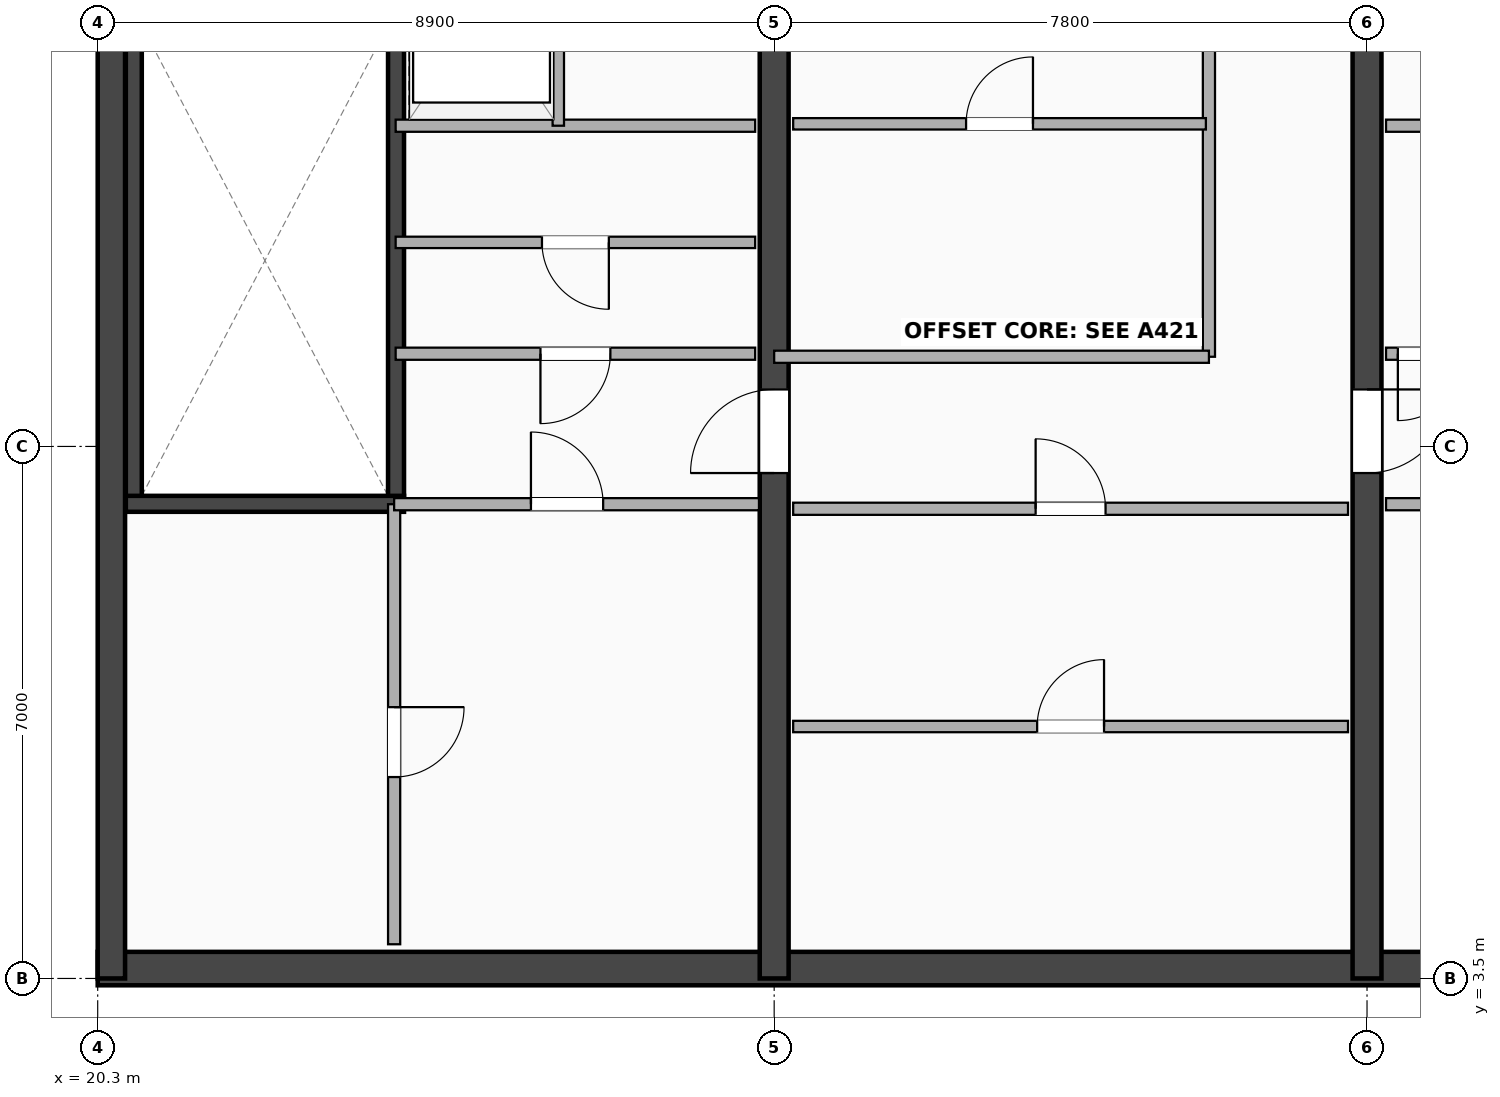
"""IFC4 building model, lengths in metres.
Left out: names, types, materials, properties, quantities, classifications, styles, units other than length and angle.
Written with IfcOpenShell. Run it as: python <this file> out.ifc"""

import sys

from ifc_helpers import new_model, si_unit, direction, frame, frame_2d, origin, place, context, subcontext, project, spatial, rectangle, extrude, element, fill, save


model = new_model("IFC4")
c1 = context("Model", 3, precision=1e-05, world=origin(), true_north=direction((0.0, 1.0)))
c2 = subcontext(c1, "Body", "Model", "MODEL_VIEW")
j1 = project(units=[si_unit("LENGTHUNIT", "METRE"), si_unit("PLANEANGLEUNIT", "RADIAN")], contexts=[c1])
p1 = place(None, origin())
s1 = spatial("IfcSite", under=j1, at=p1, CompositionType="ELEMENT")
p2 = place(p1, origin())
s2 = spatial("IfcBuilding", under=s1, at=p2, CompositionType="ELEMENT")
p3 = place(p2, frame((0.0, 0.0, 317.1)))
s3 = spatial("IfcBuildingStorey", under=s2, at=p3, CompositionType="ELEMENT", Elevation=317.1)
p4 = place(p3, frame((20.3, 3.63, 0.0), z_axis=(0.0, 0.0, 1.0), x_axis=(1.0, 0.0, 0.0)))
e1 = element("IfcWall", 1, at=p4, inside=s3, PredefinedType="SHEAR", context=c2, shape_type="SweptSolid", body=[
    extrude(rectangle(XDim=24.5, YDim=0.44, at=frame_2d((12.25, 0.0))), origin(), (0.0, 0.0, 1.0), 4.3),
])
p5 = place(p3, frame((20.48, 3.5, 0.0), z_axis=(0.0, 0.0, 1.0), x_axis=(0.0, 1.0, 0.0)))
e2 = element("IfcWall", 2, at=p5, inside=s3, PredefinedType="SHEAR", context=c2, shape_type="SweptSolid", body=[
    extrude(rectangle(XDim=16.9, YDim=0.36, at=frame_2d((8.45, 0.0))), origin(), (0.0, 0.0, 1.0), 4.3),
])
p6 = place(p3, frame((29.2, 3.5, 0.0), z_axis=(0.0, 0.0, 1.0), x_axis=(0.0, 1.0, 0.0)))
e3 = element("IfcWall", 3, at=p6, inside=s3, PredefinedType="SHEAR", context=c2, shape_type="SweptSolid", body=[
    extrude(rectangle(XDim=14.95, YDim=0.38, at=frame_2d((7.475, 0.0))), origin(), (0.0, 0.0, 1.0), 4.3),
])
p7 = place(p6, frame((7.75, 0.0, 0.0), z_axis=(0.0, 0.0, 1.0), x_axis=(-1.0, 0.0, 0.0)))
e4 = element("IfcOpeningElement", 4, at=p7, cuts=e3, PredefinedType="OPENING", context=c2, shape_type="SweptSolid", body=[
    extrude(rectangle(XDim=1.1, YDim=2.15, at=frame_2d((0.55, 1.075))), frame((0.0, 0.2, 0.0), z_axis=(0.0, -1.0, 0.0), x_axis=(1.0, 0.0, 0.0)), (0.0, 0.0, 1.0), 0.4),
])
p8 = place(p3, frame((37.0, 3.5, 0.0), z_axis=(0.0, 0.0, 1.0), x_axis=(0.0, 1.0, 0.0)))
e5 = element("IfcWall", 5, at=p8, inside=s3, PredefinedType="SHEAR", context=c2, shape_type="SweptSolid", body=[
    extrude(rectangle(XDim=14.95, YDim=0.38, at=frame_2d((7.475, 0.0))), origin(), (0.0, 0.0, 1.0), 4.3),
])
p9 = place(p8, frame((6.65, 0.0, 0.0)))
e6 = element("IfcOpeningElement", 6, at=p9, cuts=e5, PredefinedType="OPENING", context=c2, shape_type="SweptSolid", body=[
    extrude(rectangle(XDim=1.1, YDim=2.15, at=frame_2d((0.55, 1.075))), frame((0.0, 0.2, 0.0), z_axis=(0.0, -1.0, 0.0), x_axis=(1.0, 0.0, 0.0)), (0.0, 0.0, 1.0), 0.4),
])
for number, where, z_axis, x_axis in (
    (7, (20.775, 9.745, 0.0), (0.0, 0.0, 1.0), (0.0, 1.0, 0.0)),
    (8, (24.225, 9.745, 0.0), (0.0, 0.0, 1.0), (0.0, 1.0, 0.0)),
):
    element("IfcWall", number, at=place(p3, frame(where, z_axis=z_axis, x_axis=x_axis)), inside=s3, PredefinedType="SHEAR", context=c2, shape_type="SweptSolid", body=[
        extrude(rectangle(XDim=8.01, YDim=0.21, at=frame_2d((4.005, 0.0))), origin(), (0.0, 0.0, 1.0), 4.3),
    ])
p10 = place(p3, frame((20.67, 9.745, 0.0), z_axis=(0.0, 0.0, 1.0), x_axis=(1.0, 0.0, 0.0)))
e9 = element("IfcWall", 9, at=p10, inside=s3, PredefinedType="SHEAR", context=c2, shape_type="SweptSolid", body=[
    extrude(rectangle(XDim=3.66, YDim=0.21, at=frame_2d((1.83, 0.0))), origin(), (0.0, 0.0, 1.0), 4.3),
])
p11 = place(p3, frame((24.22, 14.72, 0.0), z_axis=(0.0, 0.0, 1.0), x_axis=(1.0, 0.0, 0.0)))
e10 = element("IfcWall", 10, at=p11, inside=s3, PredefinedType="PARTITIONING", context=c2, shape_type="SweptSolid", body=[
    extrude(rectangle(XDim=4.73, YDim=0.16, at=frame_2d((2.365, 0.0))), origin(), (0.0, 0.0, 1.0), 4.3),
])
p12 = place(p3, frame((26.36, 14.72, 0.0), z_axis=(0.0, 0.0, 1.0), x_axis=(0.0, 1.0, 0.0)))
e11 = element("IfcWall", 11, at=p12, inside=s3, PredefinedType="PARTITIONING", context=c2, shape_type="SweptSolid", body=[
    extrude(rectangle(XDim=3.04, YDim=0.15, at=frame_2d((1.52, 0.0))), origin(), (0.0, 0.0, 1.0), 4.3),
])
p13 = place(p3, frame((37.25, 14.72, 0.0), z_axis=(0.0, 0.0, 1.0), x_axis=(1.0, 0.0, 0.0)))
e12 = element("IfcWall", 12, at=p13, inside=s3, PredefinedType="PARTITIONING", context=c2, shape_type="SweptSolid", body=[
    extrude(rectangle(XDim=3.61, YDim=0.16, at=frame_2d((1.805, 0.0))), origin(), (0.0, 0.0, 1.0), 4.3),
])
p14 = place(p3, frame((24.22, 11.72, 0.0), z_axis=(0.0, 0.0, 1.0), x_axis=(1.0, 0.0, 0.0)))
e13 = element("IfcWall", 13, at=p14, inside=s3, PredefinedType="PARTITIONING", context=c2, shape_type="SweptSolid", body=[
    extrude(rectangle(XDim=4.73, YDim=0.16, at=frame_2d((2.365, 0.0))), origin(), (0.0, 0.0, 1.0), 4.3),
])
p15 = place(p14, frame((1.905, 0.0, 0.0)))
e14 = element("IfcOpeningElement", 14, at=p15, cuts=e13, PredefinedType="OPENING", context=c2, shape_type="SweptSolid", body=[
    extrude(rectangle(XDim=0.92, YDim=2.08, at=frame_2d((0.46, 1.04))), frame((0.0, 0.09, 0.0), z_axis=(0.0, -1.0, 0.0), x_axis=(1.0, 0.0, 0.0)), (0.0, 0.0, 1.0), 0.18),
])
p16 = place(p3, frame((24.22, 13.185, 0.0), z_axis=(0.0, 0.0, 1.0), x_axis=(1.0, 0.0, 0.0)))
e15 = element("IfcWall", 15, at=p16, inside=s3, PredefinedType="PARTITIONING", context=c2, shape_type="SweptSolid", body=[
    extrude(rectangle(XDim=4.73, YDim=0.15, at=frame_2d((2.365, 0.0))), origin(), (0.0, 0.0, 1.0), 4.3),
])
p17 = place(p16, frame((1.925, 0.0, 0.0)))
e16 = element("IfcOpeningElement", 16, at=p17, cuts=e15, PredefinedType="OPENING", context=c2, shape_type="SweptSolid", body=[
    extrude(rectangle(XDim=0.88, YDim=2.08, at=frame_2d((0.44, 1.04))), frame((0.0, 0.085, 0.0), z_axis=(0.0, -1.0, 0.0), x_axis=(1.0, 0.0, 0.0)), (0.0, 0.0, 1.0), 0.17),
])
p18 = place(p3, frame((37.25, 11.72, 0.0), z_axis=(0.0, 0.0, 1.0), x_axis=(1.0, 0.0, 0.0)))
e17 = element("IfcWall", 17, at=p18, inside=s3, PredefinedType="PARTITIONING", context=c2, shape_type="SweptSolid", body=[
    extrude(rectangle(XDim=1.191, YDim=0.16, at=frame_2d((0.596, 0.0))), origin(), (0.0, 0.0, 1.0), 4.3),
])
p19 = place(p18, frame((0.156, 0.0, 0.0)))
e18 = element("IfcOpeningElement", 18, at=p19, cuts=e17, PredefinedType="OPENING", context=c2, shape_type="SweptSolid", body=[
    extrude(rectangle(XDim=0.88, YDim=2.08, at=frame_2d((0.44, 1.04))), frame((0.0, 0.09, 0.0), z_axis=(0.0, -1.0, 0.0), x_axis=(1.0, 0.0, 0.0)), (0.0, 0.0, 1.0), 0.18),
])
p20 = place(p3, frame((24.2, 3.95, 0.0), z_axis=(0.0, 0.0, 1.0), x_axis=(0.0, 1.0, 0.0)))
e19 = element("IfcWall", 19, at=p20, inside=s3, PredefinedType="PARTITIONING", context=c2, shape_type="SweptSolid", body=[
    extrude(rectangle(XDim=5.79, YDim=0.16, at=frame_2d((2.895, 0.0))), origin(), (0.0, 0.0, 1.0), 4.3),
])
p21 = place(p20, frame((2.2, 0.0, 0.0)))
e20 = element("IfcOpeningElement", 20, at=p21, cuts=e19, PredefinedType="OPENING", context=c2, shape_type="SweptSolid", body=[
    extrude(rectangle(XDim=0.92, YDim=2.08, at=frame_2d((0.46, 1.04))), frame((0.0, 0.09, 0.0), z_axis=(0.0, -1.0, 0.0), x_axis=(1.0, 0.0, 0.0)), (0.0, 0.0, 1.0), 0.18),
])
p22 = place(p3, frame((24.2, 9.74, 0.0), z_axis=(0.0, 0.0, 1.0), x_axis=(1.0, 0.0, 0.0)))
e21 = element("IfcWall", 21, at=p22, inside=s3, PredefinedType="PARTITIONING", context=c2, shape_type="SweptSolid", body=[
    extrude(rectangle(XDim=4.8, YDim=0.16, at=frame_2d((2.4, 0.0))), origin(), (0.0, 0.0, 1.0), 4.3),
])
p23 = place(p22, frame((2.75, 0.0, 0.0), z_axis=(0.0, 0.0, 1.0), x_axis=(-1.0, 0.0, 0.0)))
e22 = element("IfcOpeningElement", 22, at=p23, cuts=e21, PredefinedType="OPENING", context=c2, shape_type="SweptSolid", body=[
    extrude(rectangle(XDim=0.95, YDim=2.15, at=frame_2d((0.475, 1.075))), frame((0.0, 0.09, 0.0), z_axis=(0.0, -1.0, 0.0), x_axis=(1.0, 0.0, 0.0)), (0.0, 0.0, 1.0), 0.18),
])
p24 = place(p3, frame((37.25, 9.74, 0.0), z_axis=(0.0, 0.0, 1.0), x_axis=(1.0, 0.0, 0.0)))
e23 = element("IfcWall", 23, at=p24, inside=s3, PredefinedType="PARTITIONING", context=c2, shape_type="SweptSolid", body=[
    extrude(rectangle(XDim=3.73, YDim=0.16, at=frame_2d((1.865, 0.0))), origin(), (0.0, 0.0, 1.0), 4.3),
])
p25 = place(p24, frame((2.25, 0.0, 0.0), z_axis=(0.0, 0.0, 1.0), x_axis=(-1.0, 0.0, 0.0)))
e24 = element("IfcOpeningElement", 24, at=p25, cuts=e23, PredefinedType="OPENING", context=c2, shape_type="SweptSolid", body=[
    extrude(rectangle(XDim=0.95, YDim=2.15, at=frame_2d((0.475, 1.075))), frame((0.0, 0.09, 0.0), z_axis=(0.0, -1.0, 0.0), x_axis=(1.0, 0.0, 0.0)), (0.0, 0.0, 1.0), 0.18),
])
p26 = place(p3, frame((34.92, 11.68, 0.0), z_axis=(0.0, 0.0, 1.0), x_axis=(0.0, 1.0, 0.0)))
e25 = element("IfcWall", 25, at=p26, inside=s3, PredefinedType="PARTITIONING", context=c2, shape_type="SweptSolid", body=[
    extrude(rectangle(XDim=6.1, YDim=0.16, at=frame_2d((3.05, 0.0))), origin(), (0.0, 0.0, 1.0), 4.3),
])
p27 = place(p3, frame((29.45, 9.68, 0.0), z_axis=(0.0, 0.0, 1.0), x_axis=(1.0, 0.0, 0.0)))
e26 = element("IfcWall", 26, at=p27, inside=s3, PredefinedType="PARTITIONING", context=c2, shape_type="SweptSolid", body=[
    extrude(rectangle(XDim=7.3, YDim=0.16, at=frame_2d((3.65, 0.0))), origin(), (0.0, 0.0, 1.0), 4.3),
])
p28 = place(p27, frame((4.11, 0.0, 0.0), z_axis=(0.0, 0.0, 1.0), x_axis=(-1.0, 0.0, 0.0)))
e27 = element("IfcOpeningElement", 27, at=p28, cuts=e26, PredefinedType="OPENING", context=c2, shape_type="SweptSolid", body=[
    extrude(rectangle(XDim=0.92, YDim=2.08, at=frame_2d((0.46, 1.04))), frame((0.0, 0.09, 0.0), z_axis=(0.0, -1.0, 0.0), x_axis=(1.0, 0.0, 0.0)), (0.0, 0.0, 1.0), 0.18),
])
p29 = place(p3, frame((29.45, 6.815, 0.0), z_axis=(0.0, 0.0, 1.0), x_axis=(1.0, 0.0, 0.0)))
e28 = element("IfcWall", 28, at=p29, inside=s3, PredefinedType="PARTITIONING", context=c2, shape_type="SweptSolid", body=[
    extrude(rectangle(XDim=7.3, YDim=0.15, at=frame_2d((3.65, 0.0))), origin(), (0.0, 0.0, 1.0), 4.3),
])
p30 = place(p29, frame((4.09, 0.0, 0.0), z_axis=(0.0, 0.0, 1.0), x_axis=(-1.0, 0.0, 0.0)))
e29 = element("IfcOpeningElement", 29, at=p30, cuts=e28, PredefinedType="OPENING", context=c2, shape_type="SweptSolid", body=[
    extrude(rectangle(XDim=0.88, YDim=2.08, at=frame_2d((0.44, 1.04))), frame((0.0, 0.085, 0.0), z_axis=(0.0, -1.0, 0.0), x_axis=(1.0, 0.0, 0.0)), (0.0, 0.0, 1.0), 0.17),
])
p31 = place(p3, frame((29.2, 11.68, 0.0), z_axis=(0.0, 0.0, 1.0), x_axis=(1.0, 0.0, 0.0)))
e30 = element("IfcWall", 30, at=p31, inside=s3, PredefinedType="PARTITIONING", context=c2, shape_type="SweptSolid", body=[
    extrude(rectangle(XDim=5.72, YDim=0.16, at=frame_2d((2.86, 0.0))), origin(), (0.0, 0.0, 1.0), 4.3),
])
p32 = place(p3, frame((29.45, 14.745, 0.0), z_axis=(0.0, 0.0, 1.0), x_axis=(1.0, 0.0, 0.0)))
e31 = element("IfcWall", 31, at=p32, inside=s3, PredefinedType="PARTITIONING", context=c2, shape_type="SweptSolid", body=[
    extrude(rectangle(XDim=5.43, YDim=0.15, at=frame_2d((2.715, 0.0))), origin(), (0.0, 0.0, 1.0), 4.3),
])
p33 = place(p32, frame((3.155, 0.0, 0.0), z_axis=(0.0, 0.0, 1.0), x_axis=(-1.0, 0.0, 0.0)))
e32 = element("IfcOpeningElement", 32, at=p33, cuts=e31, PredefinedType="OPENING", context=c2, shape_type="SweptSolid", body=[
    extrude(rectangle(XDim=0.88, YDim=2.08, at=frame_2d((0.44, 1.04))), frame((0.0, 0.085, 0.0), z_axis=(0.0, -1.0, 0.0), x_axis=(1.0, 0.0, 0.0)), (0.0, 0.0, 1.0), 0.17),
])
p34 = place(p7, origin())
e33 = element("IfcDoor", 33, at=p34, inside=s3, OperationType="SINGLE_SWING_LEFT", PredefinedType="DOOR", context=c2, shape_type="SweptSolid", body=[
    extrude(rectangle(XDim=1.1, YDim=2.15, at=frame_2d((0.55, 1.075))), frame((0.0, 0.025, 0.0), z_axis=(0.0, -1.0, 0.0), x_axis=(1.0, 0.0, 0.0)), (0.0, 0.0, 1.0), 0.05),
])
fill(e4, e33)
p35 = place(p9, origin())
e34 = element("IfcDoor", 34, at=p35, inside=s3, OperationType="SINGLE_SWING_RIGHT", PredefinedType="DOOR", context=c2, shape_type="SweptSolid", body=[
    extrude(rectangle(XDim=1.1, YDim=2.15, at=frame_2d((0.55, 1.075))), frame((0.0, 0.025, 0.0), z_axis=(0.0, -1.0, 0.0), x_axis=(1.0, 0.0, 0.0)), (0.0, 0.0, 1.0), 0.05),
])
fill(e6, e34)
p36 = place(p15, origin())
e35 = element("IfcDoor", 35, at=p36, inside=s3, OperationType="SINGLE_SWING_LEFT", PredefinedType="DOOR", context=c2, shape_type="SweptSolid", body=[
    extrude(rectangle(XDim=0.92, YDim=2.08, at=frame_2d((0.46, 1.04))), frame((0.0, 0.025, 0.0), z_axis=(0.0, -1.0, 0.0), x_axis=(1.0, 0.0, 0.0)), (0.0, 0.0, 1.0), 0.05),
])
fill(e14, e35)
p37 = place(p17, origin())
e36 = element("IfcDoor", 36, at=p37, inside=s3, OperationType="SINGLE_SWING_RIGHT", PredefinedType="DOOR", context=c2, shape_type="SweptSolid", body=[
    extrude(rectangle(XDim=0.88, YDim=2.08, at=frame_2d((0.44, 1.04))), frame((0.0, 0.025, 0.0), z_axis=(0.0, -1.0, 0.0), x_axis=(1.0, 0.0, 0.0)), (0.0, 0.0, 1.0), 0.05),
])
fill(e16, e36)
p38 = place(p19, origin())
e37 = element("IfcDoor", 37, at=p38, inside=s3, OperationType="SINGLE_SWING_LEFT", PredefinedType="DOOR", context=c2, shape_type="SweptSolid", body=[
    extrude(rectangle(XDim=0.88, YDim=2.08, at=frame_2d((0.44, 1.04))), frame((0.0, 0.025, 0.0), z_axis=(0.0, -1.0, 0.0), x_axis=(1.0, 0.0, 0.0)), (0.0, 0.0, 1.0), 0.05),
])
fill(e18, e37)
p39 = place(p21, origin())
e38 = element("IfcDoor", 38, at=p39, inside=s3, OperationType="SINGLE_SWING_RIGHT", PredefinedType="DOOR", context=c2, shape_type="SweptSolid", body=[
    extrude(rectangle(XDim=0.92, YDim=2.08, at=frame_2d((0.46, 1.04))), frame((0.0, 0.025, 0.0), z_axis=(0.0, -1.0, 0.0), x_axis=(1.0, 0.0, 0.0)), (0.0, 0.0, 1.0), 0.05),
])
fill(e20, e38)
p40 = place(p23, origin())
e39 = element("IfcDoor", 39, at=p40, inside=s3, OperationType="SINGLE_SWING_LEFT", PredefinedType="DOOR", context=c2, shape_type="SweptSolid", body=[
    extrude(rectangle(XDim=0.95, YDim=2.15, at=frame_2d((0.475, 1.075))), frame((0.0, 0.025, 0.0), z_axis=(0.0, -1.0, 0.0), x_axis=(1.0, 0.0, 0.0)), (0.0, 0.0, 1.0), 0.05),
])
fill(e22, e39)
p41 = place(p28, origin())
e40 = element("IfcDoor", 40, at=p41, inside=s3, OperationType="SINGLE_SWING_LEFT", PredefinedType="DOOR", context=c2, shape_type="SweptSolid", body=[
    extrude(rectangle(XDim=0.92, YDim=2.08, at=frame_2d((0.46, 1.04))), frame((0.0, 0.025, 0.0), z_axis=(0.0, -1.0, 0.0), x_axis=(1.0, 0.0, 0.0)), (0.0, 0.0, 1.0), 0.05),
])
fill(e27, e40)
p42 = place(p30, origin())
e41 = element("IfcDoor", 41, at=p42, inside=s3, OperationType="SINGLE_SWING_RIGHT", PredefinedType="DOOR", context=c2, shape_type="SweptSolid", body=[
    extrude(rectangle(XDim=0.88, YDim=2.08, at=frame_2d((0.44, 1.04))), frame((0.0, 0.025, 0.0), z_axis=(0.0, -1.0, 0.0), x_axis=(1.0, 0.0, 0.0)), (0.0, 0.0, 1.0), 0.05),
])
fill(e29, e41)
p43 = place(p33, origin())
e42 = element("IfcDoor", 42, at=p43, inside=s3, OperationType="SINGLE_SWING_RIGHT", PredefinedType="DOOR", context=c2, shape_type="SweptSolid", body=[
    extrude(rectangle(XDim=0.88, YDim=2.08, at=frame_2d((0.44, 1.04))), frame((0.0, 0.025, 0.0), z_axis=(0.0, -1.0, 0.0), x_axis=(1.0, 0.0, 0.0)), (0.0, 0.0, 1.0), 0.05),
])
fill(e32, e42)
save(model, sys.argv[1])
